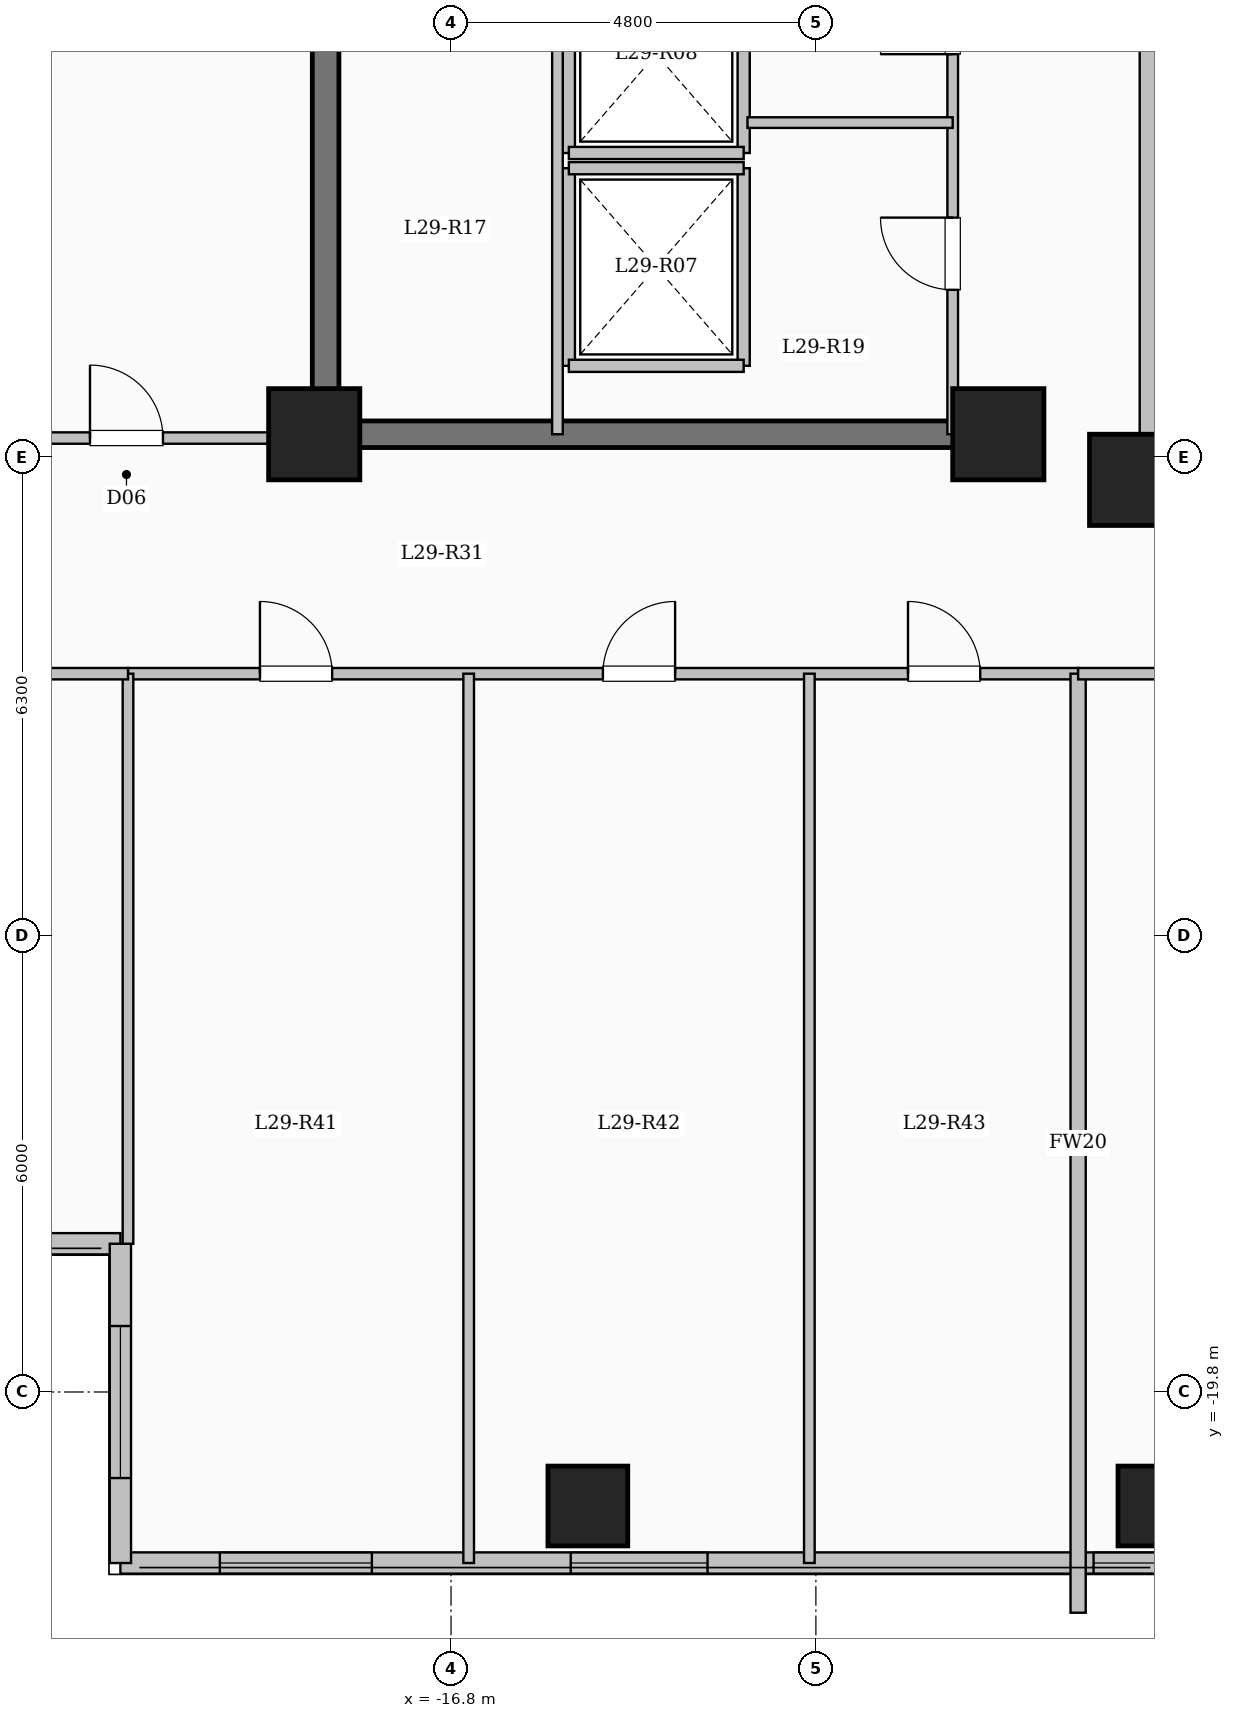
"""IFC4 building model, lengths in metres.
Left out: names, types, materials, properties, quantities, classifications, styles, units other than length and angle.
Written with IfcOpenShell. Run it as: python <this file> out.ifc"""

import sys

from ifc_helpers import new_model, si_unit, direction, frame, frame_2d, origin, origin_2d, place, context, subcontext, project, spatial, rectangle, extrude, element, fill, save


model = new_model("IFC4")
c1 = context("Model", 3, precision=1e-05, world=origin(), true_north=direction((0.0, 1.0)))
c2 = subcontext(c1, "Body", "Model", "MODEL_VIEW")
j1 = project(units=[si_unit("LENGTHUNIT", "METRE"), si_unit("PLANEANGLEUNIT", "RADIAN")], contexts=[c1])
p1 = place(None, origin())
s1 = spatial("IfcSite", under=j1, at=p1, CompositionType="ELEMENT")
p2 = place(p1, origin())
s2 = spatial("IfcBuilding", under=s1, at=p2, CompositionType="ELEMENT")
p3 = place(p2, frame((0.0, 0.0, 108.45)))
s3 = spatial("IfcBuildingStorey", under=s2, at=p3, CompositionType="ELEMENT", Elevation=108.45)
for number, where, z_axis, x_axis in (
    (1, (-7.8, -7.8, 0.0), (0.0, 0.0, 1.0), (1.0, 0.0, 0.0)),
    (2, (-9.6, -7.2, 0.0), (0.0, 0.0, 1.0), (1.0, 0.0, 0.0)),
    (3, (-18.6, -7.2, 0.0), (0.0, 0.0, 1.0), (1.0, 0.0, 0.0)),
):
    element("IfcColumn", number, at=place(p3, frame(where, z_axis=z_axis, x_axis=x_axis)), inside=s3, PredefinedType="COLUMN", context=c2, shape_type="SweptSolid", body=[
        extrude(rectangle(XDim=1.2, YDim=1.2, at=origin_2d()), origin(), (0.0, 0.0, 1.0), 3.35),
    ])
for number, where, z_axis, x_axis in (
    (4, (-15.0, -21.3, 0.0), (0.0, 0.0, 1.0), (1.0, 0.0, 0.0)),
    (5, (-7.5, -21.3, 0.0), (0.0, 0.0, 1.0), (1.0, 0.0, 0.0)),
):
    element("IfcColumn", number, at=place(p3, frame(where, z_axis=z_axis, x_axis=x_axis)), inside=s3, PredefinedType="COLUMN", context=c2, shape_type="SweptSolid", body=[
        extrude(rectangle(XDim=1.05, YDim=1.05, at=origin_2d()), origin(), (0.0, 0.0, 1.0), 3.35),
    ])
p4 = place(p3, frame((-7.62, -7.62, 0.0), z_axis=(0.0, 0.0, 1.0), x_axis=(1.0, 0.0, 0.0)))
e6 = element("IfcWall", 6, at=p4, inside=s3, PredefinedType="SOLIDWALL", context=c2, shape_type="SweptSolid", body=[
    extrude(rectangle(XDim=15.24, YDim=0.24, at=frame_2d((7.62, 0.0))), origin(), (0.0, 0.0, 1.0), 3.1),
])
p5 = place(p4, frame((6.92, 0.0, 0.95)))
e7 = element("IfcOpeningElement", 7, at=p5, cuts=e6, PredefinedType="OPENING", context=c2, shape_type="SweptSolid", body=[
    extrude(rectangle(XDim=1.4, YDim=1.5, at=frame_2d((0.7, 0.75))), frame((0.0, 0.13, 0.0), z_axis=(0.0, -1.0, 0.0), x_axis=(1.0, 0.0, 0.0)), (0.0, 0.0, 1.0), 0.26),
])
p6 = place(p3, frame((-7.62, 7.62, 0.0), z_axis=(0.0, 0.0, 1.0), x_axis=(0.0, -1.0, 0.0)))
e8 = element("IfcWall", 8, at=p6, inside=s3, PredefinedType="SOLIDWALL", context=c2, shape_type="SweptSolid", body=[
    extrude(rectangle(XDim=15.24, YDim=0.24, at=frame_2d((7.62, 0.0))), origin(), (0.0, 0.0, 1.0), 3.1),
])
p7 = place(p6, frame((6.92, 0.0, 0.95)))
e9 = element("IfcOpeningElement", 9, at=p7, cuts=e8, PredefinedType="OPENING", context=c2, shape_type="SweptSolid", body=[
    extrude(rectangle(XDim=1.4, YDim=1.5, at=frame_2d((0.7, 0.75))), frame((0.0, 0.13, 0.0), z_axis=(0.0, -1.0, 0.0), x_axis=(1.0, 0.0, 0.0)), (0.0, 0.0, 1.0), 0.26),
])
p8 = place(p3, frame((-21.15, -17.85, 0.0), z_axis=(0.0, 0.0, 1.0), x_axis=(-1.0, 0.0, 0.0)))
e10 = element("IfcWall", 10, at=p8, inside=s3, PredefinedType="SOLIDWALL", context=c2, shape_type="SweptSolid", body=[
    extrude(rectangle(XDim=5.7, YDim=0.28, at=frame_2d((2.85, 0.0))), origin(), (0.0, 0.0, 1.0), 3.1),
])
p9 = place(p8, frame((1.625, 0.0, 0.9)))
e11 = element("IfcOpeningElement", 11, at=p9, cuts=e10, PredefinedType="OPENING", context=c2, shape_type="SweptSolid", body=[
    extrude(rectangle(XDim=2.4, YDim=1.8, at=frame_2d((1.2, 0.9))), frame((0.0, 0.15, 0.0), z_axis=(0.0, -1.0, 0.0), x_axis=(1.0, 0.0, 0.0)), (0.0, 0.0, 1.0), 0.3),
])
p10 = place(p3, frame((-7.35, -22.05, 0.0), z_axis=(0.0, 0.0, 1.0), x_axis=(-1.0, 0.0, 0.0)))
e12 = element("IfcWall", 12, at=p10, inside=s3, PredefinedType="SOLIDWALL", context=c2, shape_type="SweptSolid", body=[
    extrude(rectangle(XDim=13.8, YDim=0.28, at=frame_2d((6.9, 0.0))), origin(), (0.0, 0.0, 1.0), 3.1),
])
p11 = place(p10, frame((0.147, 0.0, 0.95)))
e13 = element("IfcOpeningElement", 13, at=p11, cuts=e12, PredefinedType="OPENING", context=c2, shape_type="SweptSolid", body=[
    extrude(rectangle(XDim=0.85, YDim=1.5, at=frame_2d((0.425, 0.75))), frame((0.0, 0.15, 0.0), z_axis=(0.0, -1.0, 0.0), x_axis=(1.0, 0.0, 0.0)), (0.0, 0.0, 1.0), 0.3),
])
p12 = place(p10, frame((6.075, 0.0, 0.9)))
e14 = element("IfcOpeningElement", 14, at=p12, cuts=e12, PredefinedType="OPENING", context=c2, shape_type="SweptSolid", body=[
    extrude(rectangle(XDim=1.8, YDim=1.65, at=frame_2d((0.9, 0.825))), frame((0.0, 0.15, 0.0), z_axis=(0.0, -1.0, 0.0), x_axis=(1.0, 0.0, 0.0)), (0.0, 0.0, 1.0), 0.3),
])
p13 = place(p10, frame((10.492, 0.0, 0.9)))
e15 = element("IfcOpeningElement", 15, at=p13, cuts=e12, PredefinedType="OPENING", context=c2, shape_type="SweptSolid", body=[
    extrude(rectangle(XDim=2.0, YDim=1.7, at=frame_2d((1.0, 0.85))), frame((0.0, 0.15, 0.0), z_axis=(0.0, -1.0, 0.0), x_axis=(1.0, 0.0, 0.0)), (0.0, 0.0, 1.0), 0.3),
])
p14 = place(p3, frame((-21.15, -22.05, 0.0), z_axis=(0.0, 0.0, 1.0), x_axis=(0.0, 1.0, 0.0)))
e16 = element("IfcWall", 16, at=p14, inside=s3, PredefinedType="SOLIDWALL", context=c2, shape_type="SweptSolid", body=[
    extrude(rectangle(XDim=4.2, YDim=0.28, at=frame_2d((2.1, 0.0))), origin(), (0.0, 0.0, 1.0), 3.1),
])
p15 = place(p14, frame((1.118, 0.0, 0.9)))
e17 = element("IfcOpeningElement", 17, at=p15, cuts=e16, PredefinedType="OPENING", context=c2, shape_type="SweptSolid", body=[
    extrude(rectangle(XDim=2.0, YDim=1.7, at=frame_2d((1.0, 0.85))), frame((0.0, 0.15, 0.0), z_axis=(0.0, -1.0, 0.0), x_axis=(1.0, 0.0, 0.0)), (0.0, 0.0, 1.0), 0.3),
])
for number, where, z_axis, x_axis in (
    (18, (-15.25, -6.3, 0.0), (0.0, 0.0, 1.0), (0.0, 1.0, 0.0)),
    (19, (-12.95, -6.3, 0.0), (0.0, 0.0, 1.0), (0.0, 1.0, 0.0)),
):
    element("IfcWall", number, at=place(p3, frame(where, z_axis=z_axis, x_axis=x_axis)), inside=s3, PredefinedType="SOLIDWALL", context=c2, shape_type="SweptSolid", body=[
        extrude(rectangle(XDim=2.6, YDim=0.16, at=frame_2d((1.3, 0.0))), origin(), (0.0, 0.0, 1.0), 3.1),
    ])
for number, where, z_axis, x_axis in (
    (20, (-15.25, -6.3, 0.0), (0.0, 0.0, 1.0), (1.0, 0.0, 0.0)),
    (21, (-15.25, -3.7, 0.0), (0.0, 0.0, 1.0), (1.0, 0.0, 0.0)),
):
    element("IfcWall", number, at=place(p3, frame(where, z_axis=z_axis, x_axis=x_axis)), inside=s3, PredefinedType="SOLIDWALL", context=c2, shape_type="SweptSolid", body=[
        extrude(rectangle(XDim=2.3, YDim=0.16, at=frame_2d((1.15, 0.0))), origin(), (0.0, 0.0, 1.0), 3.1),
    ])
for number, where, z_axis, x_axis in (
    (22, (-15.25, -3.5, 0.0), (0.0, 0.0, 1.0), (0.0, 1.0, 0.0)),
    (23, (-12.95, -3.5, 0.0), (0.0, 0.0, 1.0), (0.0, 1.0, 0.0)),
):
    element("IfcWall", number, at=place(p3, frame(where, z_axis=z_axis, x_axis=x_axis)), inside=s3, PredefinedType="SOLIDWALL", context=c2, shape_type="SweptSolid", body=[
        extrude(rectangle(XDim=2.6, YDim=0.16, at=frame_2d((1.3, 0.0))), origin(), (0.0, 0.0, 1.0), 3.1),
    ])
p16 = place(p3, frame((-15.25, -3.5, 0.0), z_axis=(0.0, 0.0, 1.0), x_axis=(1.0, 0.0, 0.0)))
e24 = element("IfcWall", 24, at=p16, inside=s3, PredefinedType="SOLIDWALL", context=c2, shape_type="SweptSolid", body=[
    extrude(rectangle(XDim=2.3, YDim=0.16, at=frame_2d((1.15, 0.0))), origin(), (0.0, 0.0, 1.0), 3.1),
])
p17 = place(p3, frame((-18.45, -7.375, 0.0), z_axis=(0.0, 0.0, 1.0), x_axis=(0.0, 1.0, 0.0)))
e25 = element("IfcWall", 25, at=p17, inside=s3, PredefinedType="SHEAR", context=c2, shape_type="SweptSolid", body=[
    extrude(rectangle(XDim=14.05, YDim=0.35, at=frame_2d((7.025, 0.0))), origin(), (0.0, 0.0, 1.0), 3.35),
])
p18 = place(p3, frame((-18.625, -7.2, 0.0), z_axis=(0.0, 0.0, 1.0), x_axis=(1.0, 0.0, 0.0)))
e26 = element("IfcWall", 26, at=p18, inside=s3, PredefinedType="SHEAR", context=c2, shape_type="SweptSolid", body=[
    extrude(rectangle(XDim=8.55, YDim=0.35, at=frame_2d((4.275, 0.0))), origin(), (0.0, 0.0, 1.0), 3.35),
])
p19 = place(p3, frame((-15.4, -7.2, 0.0), z_axis=(0.0, 0.0, 1.0), x_axis=(0.0, 1.0, 0.0)))
e27 = element("IfcWall", 27, at=p19, inside=s3, PredefinedType="PARTITIONING", context=c2, shape_type="SweptSolid", body=[
    extrude(rectangle(XDim=10.45, YDim=0.14, at=frame_2d((5.225, 0.0))), origin(), (0.0, 0.0, 1.0), 3.1),
])
p20 = place(p19, frame((9.25, 0.0, 0.0)))
e28 = element("IfcOpeningElement", 28, at=p20, cuts=e27, PredefinedType="OPENING", context=c2, shape_type="SweptSolid", body=[
    extrude(rectangle(XDim=0.9, YDim=2.08, at=frame_2d((0.45, 1.04))), frame((0.0, 0.08, 0.0), z_axis=(0.0, -1.0, 0.0), x_axis=(1.0, 0.0, 0.0)), (0.0, 0.0, 1.0), 0.16),
])
p21 = place(p3, frame((-10.2, -7.2, 0.0), z_axis=(0.0, 0.0, 1.0), x_axis=(0.0, 1.0, 0.0)))
e29 = element("IfcWall", 29, at=p21, inside=s3, PredefinedType="PARTITIONING", context=c2, shape_type="SweptSolid", body=[
    extrude(rectangle(XDim=9.12, YDim=0.14, at=frame_2d((4.56, 0.0))), origin(), (0.0, 0.0, 1.0), 3.1),
])
p22 = place(p21, frame((1.9, 0.0, 0.0)))
e30 = element("IfcOpeningElement", 30, at=p22, cuts=e29, PredefinedType="OPENING", context=c2, shape_type="SweptSolid", body=[
    extrude(rectangle(XDim=0.95, YDim=2.12, at=frame_2d((0.475, 1.06))), frame((0.0, 0.08, 0.0), z_axis=(0.0, -1.0, 0.0), x_axis=(1.0, 0.0, 0.0)), (0.0, 0.0, 1.0), 0.16),
])
p23 = place(p21, frame((5.0, 0.0, 0.0)))
e31 = element("IfcOpeningElement", 31, at=p23, cuts=e29, PredefinedType="OPENING", context=c2, shape_type="SweptSolid", body=[
    extrude(rectangle(XDim=0.95, YDim=2.12, at=frame_2d((0.475, 1.06))), frame((0.0, 0.08, 0.0), z_axis=(0.0, -1.0, 0.0), x_axis=(1.0, 0.0, 0.0)), (0.0, 0.0, 1.0), 0.16),
])
p24 = place(p3, frame((-12.9, -3.1, 0.0), z_axis=(0.0, 0.0, 1.0), x_axis=(1.0, 0.0, 0.0)))
e32 = element("IfcWall", 32, at=p24, inside=s3, PredefinedType="PARTITIONING", context=c2, shape_type="SweptSolid", body=[
    extrude(rectangle(XDim=2.7, YDim=0.14, at=frame_2d((1.35, 0.0))), origin(), (0.0, 0.0, 1.0), 3.1),
])
p25 = place(p3, frame((-21.05, -10.35, 0.0), z_axis=(0.0, 0.0, 1.0), x_axis=(1.0, 0.0, 0.0)))
e33 = element("IfcWall", 33, at=p25, inside=s3, PredefinedType="PARTITIONING", context=c2, shape_type="SweptSolid", body=[
    extrude(rectangle(XDim=12.5, YDim=0.15, at=frame_2d((6.25, 0.0))), origin(), (0.0, 0.0, 1.0), 3.1),
])
p26 = place(p25, frame((1.736, 0.0, 0.0)))
e34 = element("IfcOpeningElement", 34, at=p26, cuts=e33, PredefinedType="OPENING", context=c2, shape_type="SweptSolid", body=[
    extrude(rectangle(XDim=0.95, YDim=2.15, at=frame_2d((0.475, 1.075))), frame((0.0, 0.085, 0.0), z_axis=(0.0, -1.0, 0.0), x_axis=(1.0, 0.0, 0.0)), (0.0, 0.0, 1.0), 0.17),
])
p27 = place(p25, frame((6.248, 0.0, 0.0)))
e35 = element("IfcOpeningElement", 35, at=p27, cuts=e33, PredefinedType="OPENING", context=c2, shape_type="SweptSolid", body=[
    extrude(rectangle(XDim=0.95, YDim=2.15, at=frame_2d((0.475, 1.075))), frame((0.0, 0.085, 0.0), z_axis=(0.0, -1.0, 0.0), x_axis=(1.0, 0.0, 0.0)), (0.0, 0.0, 1.0), 0.17),
])
p28 = place(p25, frame((10.262, 0.0, 0.0)))
e36 = element("IfcOpeningElement", 36, at=p28, cuts=e33, PredefinedType="OPENING", context=c2, shape_type="SweptSolid", body=[
    extrude(rectangle(XDim=0.95, YDim=2.15, at=frame_2d((0.475, 1.075))), frame((0.0, 0.085, 0.0), z_axis=(0.0, -1.0, 0.0), x_axis=(1.0, 0.0, 0.0)), (0.0, 0.0, 1.0), 0.17),
])
for number, where, z_axis, x_axis in (
    (37, (-16.568, -22.05, 0.0), (0.0, 0.0, 1.0), (0.0, 1.0, 0.0)),
    (38, (-12.086, -22.05, 0.0), (0.0, 0.0, 1.0), (0.0, 1.0, 0.0)),
):
    element("IfcWall", number, at=place(p3, frame(where, z_axis=z_axis, x_axis=x_axis)), inside=s3, PredefinedType="PARTITIONING", context=c2, shape_type="SweptSolid", body=[
        extrude(rectangle(XDim=11.7, YDim=0.14, at=frame_2d((5.85, 0.0))), origin(), (0.0, 0.0, 1.0), 3.1),
    ])
p29 = place(p3, frame((-8.55, -22.704, 0.0), z_axis=(0.0, 0.0, 1.0), x_axis=(0.0, 1.0, 0.0)))
e39 = element("IfcWall", 39, at=p29, inside=s3, PredefinedType="SOLIDWALL", context=c2, shape_type="SweptSolid", body=[
    extrude(rectangle(XDim=12.354, YDim=0.2, at=frame_2d((6.177, 0.0))), origin(), (0.0, 0.0, 1.0), 3.1),
])
p30 = place(p3, frame((-8.55, -10.35, 0.0), z_axis=(0.0, 0.0, 1.0), x_axis=(1.0, 0.0, 0.0)))
e40 = element("IfcWall", 40, at=p30, inside=s3, PredefinedType="PARTITIONING", context=c2, shape_type="SweptSolid", body=[
    extrude(rectangle(XDim=17.1, YDim=0.15, at=frame_2d((8.55, 0.0))), origin(), (0.0, 0.0, 1.0), 3.1),
])
p31 = place(p30, frame((1.6, 0.0, 0.0)))
e41 = element("IfcOpeningElement", 41, at=p31, cuts=e40, PredefinedType="OPENING", context=c2, shape_type="SweptSolid", body=[
    extrude(rectangle(XDim=0.95, YDim=2.15, at=frame_2d((0.475, 1.075))), frame((0.0, 0.085, 0.0), z_axis=(0.0, -1.0, 0.0), x_axis=(1.0, 0.0, 0.0)), (0.0, 0.0, 1.0), 0.17),
])
p32 = place(p30, frame((10.5, 0.0, 0.0)))
e42 = element("IfcOpeningElement", 42, at=p32, cuts=e40, PredefinedType="OPENING", context=c2, shape_type="SweptSolid", body=[
    extrude(rectangle(XDim=0.95, YDim=2.15, at=frame_2d((0.475, 1.075))), frame((0.0, 0.085, 0.0), z_axis=(0.0, -1.0, 0.0), x_axis=(1.0, 0.0, 0.0)), (0.0, 0.0, 1.0), 0.17),
])
p33 = place(p3, frame((-26.88, -7.25, 0.0), z_axis=(0.0, 0.0, 1.0), x_axis=(1.0, 0.0, 0.0)))
e43 = element("IfcWall", 43, at=p33, inside=s3, PredefinedType="PARTITIONING", context=c2, shape_type="SweptSolid", body=[
    extrude(rectangle(XDim=8.43, YDim=0.15, at=frame_2d((4.215, 0.0))), origin(), (0.0, 0.0, 1.0), 3.1),
])
p34 = place(p33, frame((5.33, 0.0, 0.0)))
e44 = element("IfcOpeningElement", 44, at=p34, cuts=e43, PredefinedType="OPENING", context=c2, shape_type="SweptSolid", body=[
    extrude(rectangle(XDim=0.96, YDim=2.15, at=frame_2d((0.48, 1.075))), frame((0.0, 0.085, 0.0), z_axis=(0.0, -1.0, 0.0), x_axis=(1.0, 0.0, 0.0)), (0.0, 0.0, 1.0), 0.17),
])
p35 = place(p3, frame((-21.05, -17.85, 0.0), z_axis=(0.0, 0.0, 1.0), x_axis=(0.0, 1.0, 0.0)))
e45 = element("IfcWall", 45, at=p35, inside=s3, PredefinedType="PARTITIONING", context=c2, shape_type="SweptSolid", body=[
    extrude(rectangle(XDim=7.5, YDim=0.14, at=frame_2d((3.75, 0.0))), origin(), (0.0, 0.0, 1.0), 3.1),
])
p36 = place(p3, frame((-26.88, -10.35, 0.0), z_axis=(0.0, 0.0, 1.0), x_axis=(1.0, 0.0, 0.0)))
e46 = element("IfcWall", 46, at=p36, inside=s3, PredefinedType="PARTITIONING", context=c2, shape_type="SweptSolid", body=[
    extrude(rectangle(XDim=5.83, YDim=0.15, at=frame_2d((2.915, 0.0))), origin(), (0.0, 0.0, 1.0), 3.1),
])
p37 = place(p36, frame((2.44, 0.0, 0.0)))
e47 = element("IfcOpeningElement", 47, at=p37, cuts=e46, PredefinedType="OPENING", context=c2, shape_type="SweptSolid", body=[
    extrude(rectangle(XDim=0.95, YDim=2.15, at=frame_2d((0.475, 1.075))), frame((0.0, 0.085, 0.0), z_axis=(0.0, -1.0, 0.0), x_axis=(1.0, 0.0, 0.0)), (0.0, 0.0, 1.0), 0.17),
])
p38 = place(p11, origin())
e48 = element("IfcWindow", 48, at=p38, inside=s3, PartitioningType="SINGLE_PANEL", PredefinedType="WINDOW", context=c2, shape_type="SweptSolid", body=[
    extrude(rectangle(XDim=0.85, YDim=1.5, at=frame_2d((0.425, 0.75))), frame((0.0, 0.03, 0.0), z_axis=(0.0, -1.0, 0.0), x_axis=(1.0, 0.0, 0.0)), (0.0, 0.0, 1.0), 0.06),
])
fill(e13, e48)
p39 = place(p12, origin())
e49 = element("IfcWindow", 49, at=p39, inside=s3, PartitioningType="SINGLE_PANEL", PredefinedType="WINDOW", context=c2, shape_type="SweptSolid", body=[
    extrude(rectangle(XDim=1.8, YDim=1.65, at=frame_2d((0.9, 0.825))), frame((0.0, 0.03, 0.0), z_axis=(0.0, -1.0, 0.0), x_axis=(1.0, 0.0, 0.0)), (0.0, 0.0, 1.0), 0.06),
])
fill(e14, e49)
p40 = place(p13, origin())
e50 = element("IfcWindow", 50, at=p40, inside=s3, PartitioningType="SINGLE_PANEL", PredefinedType="WINDOW", context=c2, shape_type="SweptSolid", body=[
    extrude(rectangle(XDim=2.0, YDim=1.7, at=frame_2d((1.0, 0.85))), frame((0.0, 0.03, 0.0), z_axis=(0.0, -1.0, 0.0), x_axis=(1.0, 0.0, 0.0)), (0.0, 0.0, 1.0), 0.06),
])
fill(e15, e50)
p41 = place(p15, origin())
e51 = element("IfcWindow", 51, at=p41, inside=s3, PartitioningType="SINGLE_PANEL", PredefinedType="WINDOW", context=c2, shape_type="SweptSolid", body=[
    extrude(rectangle(XDim=2.0, YDim=1.7, at=frame_2d((1.0, 0.85))), frame((0.0, 0.03, 0.0), z_axis=(0.0, -1.0, 0.0), x_axis=(1.0, 0.0, 0.0)), (0.0, 0.0, 1.0), 0.06),
])
fill(e17, e51)
p42 = place(p22, origin())
e52 = element("IfcDoor", 52, at=p42, inside=s3, OperationType="SINGLE_SWING_RIGHT", PredefinedType="DOOR", context=c2, shape_type="SweptSolid", body=[
    extrude(rectangle(XDim=0.95, YDim=2.12, at=frame_2d((0.475, 1.06))), frame((0.0, 0.025, 0.0), z_axis=(0.0, -1.0, 0.0), x_axis=(1.0, 0.0, 0.0)), (0.0, 0.0, 1.0), 0.05),
])
fill(e30, e52)
p43 = place(p23, origin())
e53 = element("IfcDoor", 53, at=p43, inside=s3, OperationType="SINGLE_SWING_LEFT", PredefinedType="DOOR", context=c2, shape_type="SweptSolid", body=[
    extrude(rectangle(XDim=0.95, YDim=2.12, at=frame_2d((0.475, 1.06))), frame((0.0, 0.025, 0.0), z_axis=(0.0, -1.0, 0.0), x_axis=(1.0, 0.0, 0.0)), (0.0, 0.0, 1.0), 0.05),
])
fill(e31, e53)
p44 = place(p26, origin())
e54 = element("IfcDoor", 54, at=p44, inside=s3, OperationType="SINGLE_SWING_LEFT", PredefinedType="DOOR", context=c2, shape_type="SweptSolid", body=[
    extrude(rectangle(XDim=0.95, YDim=2.15, at=frame_2d((0.475, 1.075))), frame((0.0, 0.025, 0.0), z_axis=(0.0, -1.0, 0.0), x_axis=(1.0, 0.0, 0.0)), (0.0, 0.0, 1.0), 0.05),
])
fill(e34, e54)
p45 = place(p27, origin())
e55 = element("IfcDoor", 55, at=p45, inside=s3, OperationType="SINGLE_SWING_RIGHT", PredefinedType="DOOR", context=c2, shape_type="SweptSolid", body=[
    extrude(rectangle(XDim=0.95, YDim=2.15, at=frame_2d((0.475, 1.075))), frame((0.0, 0.025, 0.0), z_axis=(0.0, -1.0, 0.0), x_axis=(1.0, 0.0, 0.0)), (0.0, 0.0, 1.0), 0.05),
])
fill(e35, e55)
p46 = place(p28, origin())
e56 = element("IfcDoor", 56, at=p46, inside=s3, OperationType="SINGLE_SWING_LEFT", PredefinedType="DOOR", context=c2, shape_type="SweptSolid", body=[
    extrude(rectangle(XDim=0.95, YDim=2.15, at=frame_2d((0.475, 1.075))), frame((0.0, 0.025, 0.0), z_axis=(0.0, -1.0, 0.0), x_axis=(1.0, 0.0, 0.0)), (0.0, 0.0, 1.0), 0.05),
])
fill(e36, e56)
p47 = place(p34, origin())
e57 = element("IfcDoor", 57, at=p47, inside=s3, OperationType="SINGLE_SWING_LEFT", PredefinedType="DOOR", context=c2, shape_type="SweptSolid", body=[
    extrude(rectangle(XDim=0.96, YDim=2.15, at=frame_2d((0.48, 1.075))), frame((0.0, 0.025, 0.0), z_axis=(0.0, -1.0, 0.0), x_axis=(1.0, 0.0, 0.0)), (0.0, 0.0, 1.0), 0.05),
])
fill(e44, e57)
save(model, sys.argv[1])
